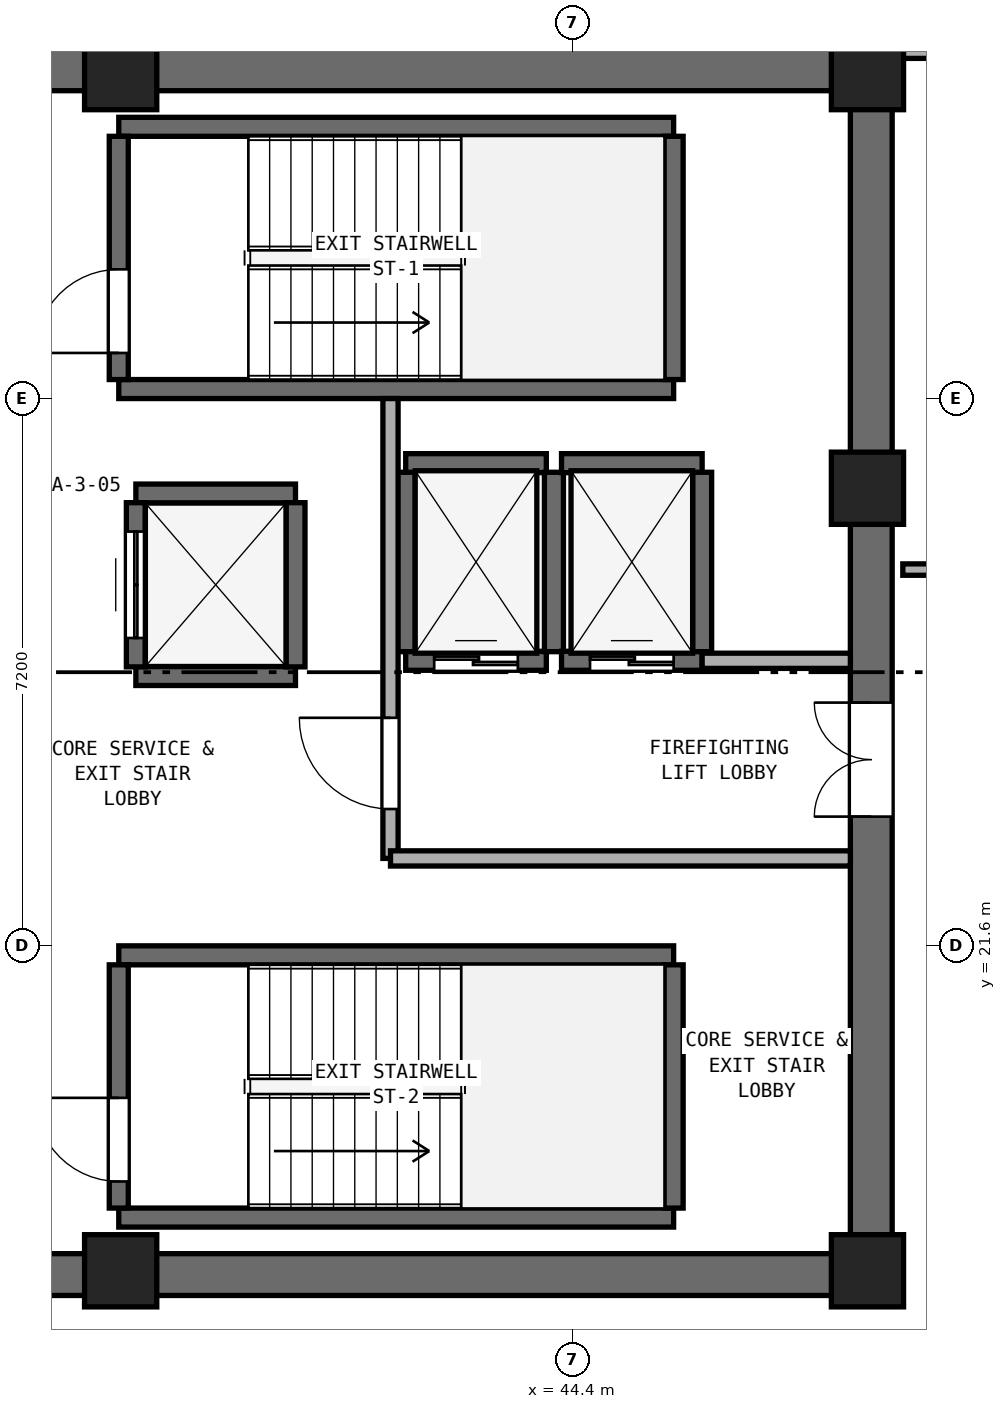
"""IFC4 building model, lengths in metres.
Left out: names, types, materials, properties, quantities, classifications, styles, units other than length and angle.
Written with IfcOpenShell. Run it as: python <this file> out.ifc"""

import sys

from ifc_helpers import new_model, si_unit, direction, frame, frame_2d, origin, origin_2d, place, context, subcontext, project, spatial, rectangle, extrude, element, fill, save


model = new_model("IFC4")
c1 = context("Model", 3, precision=1e-05, world=origin(), true_north=direction((0.0, 1.0)))
c2 = subcontext(c1, "Body", "Model", "MODEL_VIEW")
j1 = project(units=[si_unit("LENGTHUNIT", "METRE"), si_unit("PLANEANGLEUNIT", "RADIAN")], contexts=[c1])
p1 = place(None, origin())
s1 = spatial("IfcSite", under=j1, at=p1, CompositionType="ELEMENT")
p2 = place(p1, origin())
s2 = spatial("IfcBuilding", under=s1, at=p2, CompositionType="ELEMENT")
p3 = place(p2, frame((0.0, 0.0, 166.8)))
s3 = spatial("IfcBuildingStorey", under=s2, at=p3, CompositionType="ELEMENT", Elevation=166.8)
for number, where, z_axis, x_axis in (
    (1, (25.4, 17.275, 0.0), (0.0, 0.0, 1.0), (1.0, 0.0, 0.0)),
    (2, (25.4, 33.125, 0.0), (0.0, 0.0, 1.0), (1.0, 0.0, 0.0)),
):
    element("IfcWall", number, at=place(p3, frame(where, z_axis=z_axis, x_axis=x_axis)), inside=s3, PredefinedType="SHEAR", context=c2, shape_type="SweptSolid", body=[
        extrude(rectangle(XDim=23.2, YDim=0.55, at=frame_2d((11.6, 0.0))), origin(), (0.0, 0.0, 1.0), 3.54),
    ])
p4 = place(p3, frame((48.325, 17.55, 0.0), z_axis=(0.0, 0.0, 1.0), x_axis=(0.0, 1.0, 0.0)))
e3 = element("IfcWall", 3, at=p4, inside=s3, PredefinedType="SHEAR", context=c2, shape_type="SweptSolid", body=[
    extrude(rectangle(XDim=15.3, YDim=0.55, at=frame_2d((7.65, 0.0))), origin(), (0.0, 0.0, 1.0), 3.54),
])
p5 = place(p4, frame((5.75, 0.0, 0.0)))
e4 = element("IfcOpeningElement", 4, at=p5, cuts=e3, PredefinedType="OPENING", context=c2, shape_type="SweptSolid", body=[
    extrude(rectangle(XDim=1.5, YDim=2.15, at=frame_2d((0.75, 1.075))), frame((0.0, 0.285, 0.0), z_axis=(0.0, -1.0, 0.0), x_axis=(1.0, 0.0, 0.0)), (0.0, 0.0, 1.0), 0.57),
])
for number, where, z_axis, x_axis in (
    (5, (38.45, 17.325, 0.0), (0.0, 0.0, 1.0), (1.0, 0.0, 0.0)),
    (6, (48.275, 17.325, 0.0), (0.0, 0.0, 1.0), (1.0, 0.0, 0.0)),
    (7, (48.275, 27.62, 0.0), (0.0, 0.0, 1.0), (1.0, 0.0, 0.0)),
    (8, (48.275, 33.075, 0.0), (0.0, 0.0, 1.0), (1.0, 0.0, 0.0)),
    (9, (38.45, 33.075, 0.0), (0.0, 0.0, 1.0), (1.0, 0.0, 0.0)),
):
    element("IfcColumn", number, at=place(p3, frame(where, z_axis=z_axis, x_axis=x_axis)), inside=s3, PredefinedType="PILASTER", context=c2, shape_type="SweptSolid", body=[
        extrude(rectangle(XDim=0.95, YDim=0.95, at=origin_2d()), origin(), (0.0, 0.0, 1.0), 3.8),
    ])
for number, where, z_axis, x_axis in (
    (10, (38.425, 28.925, 0.0), (0.0, 0.0, 1.0), (1.0, 0.0, 0.0)),
    (11, (38.425, 32.375, 0.0), (0.0, 0.0, 1.0), (1.0, 0.0, 0.0)),
):
    element("IfcWall", number, at=place(p3, frame(where, z_axis=z_axis, x_axis=x_axis)), inside=s3, PredefinedType="SHEAR", context=c2, shape_type="SweptSolid", body=[
        extrude(rectangle(XDim=7.3, YDim=0.25, at=frame_2d((3.65, 0.0))), origin(), (0.0, 0.0, 1.0), 3.54),
    ])
p6 = place(p3, frame((38.425, 29.05, 0.0), z_axis=(0.0, 0.0, 1.0), x_axis=(0.0, 1.0, 0.0)))
e12 = element("IfcWall", 12, at=p6, inside=s3, PredefinedType="SHEAR", context=c2, shape_type="SweptSolid", body=[
    extrude(rectangle(XDim=3.2, YDim=0.25, at=frame_2d((1.6, 0.0))), origin(), (0.0, 0.0, 1.0), 3.54),
])
p7 = place(p6, frame((0.35, 0.0, 0.0)))
e13 = element("IfcOpeningElement", 13, at=p7, cuts=e12, PredefinedType="OPENING", context=c2, shape_type="SweptSolid", body=[
    extrude(rectangle(XDim=1.1, YDim=2.15, at=frame_2d((0.55, 1.075))), frame((0.0, 0.135, 0.0), z_axis=(0.0, -1.0, 0.0), x_axis=(1.0, 0.0, 0.0)), (0.0, 0.0, 1.0), 0.27),
])
p8 = place(p3, frame((45.725, 29.05, 0.0), z_axis=(0.0, 0.0, 1.0), x_axis=(0.0, 1.0, 0.0)))
e14 = element("IfcWall", 14, at=p8, inside=s3, PredefinedType="SHEAR", context=c2, shape_type="SweptSolid", body=[
    extrude(rectangle(XDim=3.2, YDim=0.25, at=frame_2d((1.6, 0.0))), origin(), (0.0, 0.0, 1.0), 3.54),
])
for number, where, z_axis, x_axis in (
    (15, (38.425, 18.025, 0.0), (0.0, 0.0, 1.0), (1.0, 0.0, 0.0)),
    (16, (38.425, 21.475, 0.0), (0.0, 0.0, 1.0), (1.0, 0.0, 0.0)),
):
    element("IfcWall", number, at=place(p3, frame(where, z_axis=z_axis, x_axis=x_axis)), inside=s3, PredefinedType="SHEAR", context=c2, shape_type="SweptSolid", body=[
        extrude(rectangle(XDim=7.3, YDim=0.25, at=frame_2d((3.65, 0.0))), origin(), (0.0, 0.0, 1.0), 3.54),
    ])
p9 = place(p3, frame((38.425, 18.15, 0.0), z_axis=(0.0, 0.0, 1.0), x_axis=(0.0, 1.0, 0.0)))
e17 = element("IfcWall", 17, at=p9, inside=s3, PredefinedType="SHEAR", context=c2, shape_type="SweptSolid", body=[
    extrude(rectangle(XDim=3.2, YDim=0.25, at=frame_2d((1.6, 0.0))), origin(), (0.0, 0.0, 1.0), 3.54),
])
p10 = place(p9, frame((0.35, 0.0, 0.0)))
e18 = element("IfcOpeningElement", 18, at=p10, cuts=e17, PredefinedType="OPENING", context=c2, shape_type="SweptSolid", body=[
    extrude(rectangle(XDim=1.1, YDim=2.15, at=frame_2d((0.55, 1.075))), frame((0.0, 0.135, 0.0), z_axis=(0.0, -1.0, 0.0), x_axis=(1.0, 0.0, 0.0)), (0.0, 0.0, 1.0), 0.27),
])
p11 = place(p3, frame((45.725, 18.15, 0.0), z_axis=(0.0, 0.0, 1.0), x_axis=(0.0, 1.0, 0.0)))
e19 = element("IfcWall", 19, at=p11, inside=s3, PredefinedType="SHEAR", context=c2, shape_type="SweptSolid", body=[
    extrude(rectangle(XDim=3.2, YDim=0.25, at=frame_2d((1.6, 0.0))), origin(), (0.0, 0.0, 1.0), 3.54),
])
p12 = place(p3, frame((42.2, 25.35, 0.0), z_axis=(0.0, 0.0, 1.0), x_axis=(1.0, 0.0, 0.0)))
e20 = element("IfcWall", 20, at=p12, inside=s3, PredefinedType="SHEAR", context=c2, shape_type="SweptSolid", body=[
    extrude(rectangle(XDim=1.85, YDim=0.25, at=frame_2d((0.925, 0.0))), origin(), (0.0, 0.0, 1.0), 3.54),
])
p13 = place(p12, frame((0.375, 0.0, 0.0)))
e21 = element("IfcOpeningElement", 21, at=p13, cuts=e20, PredefinedType="OPENING", context=c2, shape_type="SweptSolid", body=[
    extrude(rectangle(XDim=1.1, YDim=2.15, at=frame_2d((0.55, 1.075))), frame((0.0, 0.135, 0.0), z_axis=(0.0, -1.0, 0.0), x_axis=(1.0, 0.0, 0.0)), (0.0, 0.0, 1.0), 0.27),
])
p14 = place(p3, frame((42.2, 27.95, 0.0), z_axis=(0.0, 0.0, 1.0), x_axis=(1.0, 0.0, 0.0)))
e22 = element("IfcWall", 22, at=p14, inside=s3, PredefinedType="SHEAR", context=c2, shape_type="SweptSolid", body=[
    extrude(rectangle(XDim=1.85, YDim=0.25, at=frame_2d((0.925, 0.0))), origin(), (0.0, 0.0, 1.0), 3.54),
])
for number, where, z_axis, x_axis in (
    (23, (42.2, 25.47, 0.0), (0.0, 0.0, 1.0), (0.0, 1.0, 0.0)),
    (24, (44.15, 25.47, 0.0), (0.0, 0.0, 1.0), (0.0, 1.0, 0.0)),
):
    element("IfcWall", number, at=place(p3, frame(where, z_axis=z_axis, x_axis=x_axis)), inside=s3, PredefinedType="SHEAR", context=c2, shape_type="SweptSolid", body=[
        extrude(rectangle(XDim=2.36, YDim=0.25, at=frame_2d((1.18, 0.0))), origin(), (0.0, 0.0, 1.0), 3.54),
    ])
p15 = place(p3, frame((44.25, 25.35, 0.0), z_axis=(0.0, 0.0, 1.0), x_axis=(1.0, 0.0, 0.0)))
e25 = element("IfcWall", 25, at=p15, inside=s3, PredefinedType="SHEAR", context=c2, shape_type="SweptSolid", body=[
    extrude(rectangle(XDim=1.85, YDim=0.25, at=frame_2d((0.925, 0.0))), origin(), (0.0, 0.0, 1.0), 3.54),
])
p16 = place(p15, frame((0.375, 0.0, 0.0)))
e26 = element("IfcOpeningElement", 26, at=p16, cuts=e25, PredefinedType="OPENING", context=c2, shape_type="SweptSolid", body=[
    extrude(rectangle(XDim=1.1, YDim=2.15, at=frame_2d((0.55, 1.075))), frame((0.0, 0.135, 0.0), z_axis=(0.0, -1.0, 0.0), x_axis=(1.0, 0.0, 0.0)), (0.0, 0.0, 1.0), 0.27),
])
p17 = place(p3, frame((44.25, 27.95, 0.0), z_axis=(0.0, 0.0, 1.0), x_axis=(1.0, 0.0, 0.0)))
e27 = element("IfcWall", 27, at=p17, inside=s3, PredefinedType="SHEAR", context=c2, shape_type="SweptSolid", body=[
    extrude(rectangle(XDim=1.85, YDim=0.25, at=frame_2d((0.925, 0.0))), origin(), (0.0, 0.0, 1.0), 3.54),
])
p18 = place(p3, frame((46.1, 25.47, 0.0), z_axis=(0.0, 0.0, 1.0), x_axis=(0.0, 1.0, 0.0)))
e28 = element("IfcWall", 28, at=p18, inside=s3, PredefinedType="SHEAR", context=c2, shape_type="SweptSolid", body=[
    extrude(rectangle(XDim=2.36, YDim=0.25, at=frame_2d((1.18, 0.0))), origin(), (0.0, 0.0, 1.0), 3.54),
])
for number, where, z_axis, x_axis in (
    (29, (38.65, 25.15, 0.0), (0.0, 0.0, 1.0), (1.0, 0.0, 0.0)),
    (30, (38.65, 27.55, 0.0), (0.0, 0.0, 1.0), (1.0, 0.0, 0.0)),
):
    element("IfcWall", number, at=place(p3, frame(where, z_axis=z_axis, x_axis=x_axis)), inside=s3, PredefinedType="SHEAR", context=c2, shape_type="SweptSolid", body=[
        extrude(rectangle(XDim=2.1, YDim=0.25, at=frame_2d((1.05, 0.0))), origin(), (0.0, 0.0, 1.0), 3.54),
    ])
p19 = place(p3, frame((38.65, 25.27, 0.0), z_axis=(0.0, 0.0, 1.0), x_axis=(0.0, 1.0, 0.0)))
e31 = element("IfcWall", 31, at=p19, inside=s3, PredefinedType="SHEAR", context=c2, shape_type="SweptSolid", body=[
    extrude(rectangle(XDim=2.16, YDim=0.25, at=frame_2d((1.08, 0.0))), origin(), (0.0, 0.0, 1.0), 3.54),
])
p20 = place(p19, frame((0.38, 0.0, 0.0)))
e32 = element("IfcOpeningElement", 32, at=p20, cuts=e31, PredefinedType="OPENING", context=c2, shape_type="SweptSolid", body=[
    extrude(rectangle(XDim=1.4, YDim=2.2, at=frame_2d((0.7, 1.1))), frame((0.0, 0.135, 0.0), z_axis=(0.0, -1.0, 0.0), x_axis=(1.0, 0.0, 0.0)), (0.0, 0.0, 1.0), 0.27),
])
p21 = place(p3, frame((40.75, 25.27, 0.0), z_axis=(0.0, 0.0, 1.0), x_axis=(0.0, 1.0, 0.0)))
e33 = element("IfcWall", 33, at=p21, inside=s3, PredefinedType="SHEAR", context=c2, shape_type="SweptSolid", body=[
    extrude(rectangle(XDim=2.16, YDim=0.25, at=frame_2d((1.08, 0.0))), origin(), (0.0, 0.0, 1.0), 3.54),
])
p22 = place(p3, frame((42.0, 22.75, 0.0), z_axis=(0.0, 0.0, 1.0), x_axis=(0.0, 1.0, 0.0)))
e34 = element("IfcWall", 34, at=p22, inside=s3, PredefinedType="SOLIDWALL", context=c2, shape_type="SweptSolid", body=[
    extrude(rectangle(XDim=6.05, YDim=0.2, at=frame_2d((3.025, 0.0))), origin(), (0.0, 0.0, 1.0), 3.54),
])
p23 = place(p22, frame((0.65, 0.0, 0.0)))
e35 = element("IfcOpeningElement", 35, at=p23, cuts=e34, PredefinedType="OPENING", context=c2, shape_type="SweptSolid", body=[
    extrude(rectangle(XDim=1.2, YDim=2.15, at=frame_2d((0.6, 1.075))), frame((0.0, 0.11, 0.0), z_axis=(0.0, -1.0, 0.0), x_axis=(1.0, 0.0, 0.0)), (0.0, 0.0, 1.0), 0.22),
])
p24 = place(p3, frame((42.0, 22.75, 0.0), z_axis=(0.0, 0.0, 1.0), x_axis=(1.0, 0.0, 0.0)))
e36 = element("IfcWall", 36, at=p24, inside=s3, PredefinedType="SOLIDWALL", context=c2, shape_type="SweptSolid", body=[
    extrude(rectangle(XDim=6.05, YDim=0.2, at=frame_2d((3.025, 0.0))), origin(), (0.0, 0.0, 1.0), 3.54),
])
p25 = place(p3, frame((46.1, 25.35, 0.0), z_axis=(0.0, 0.0, 1.0), x_axis=(1.0, 0.0, 0.0)))
e37 = element("IfcWall", 37, at=p25, inside=s3, PredefinedType="SOLIDWALL", context=c2, shape_type="SweptSolid", body=[
    extrude(rectangle(XDim=1.95, YDim=0.2, at=frame_2d((0.975, 0.0))), origin(), (0.0, 0.0, 1.0), 3.54),
])
p26 = place(p3, frame((48.74, 26.55, 0.0), z_axis=(0.0, 0.0, 1.0), x_axis=(1.0, 0.0, 0.0)))
e38 = element("IfcWall", 38, at=p26, inside=s3, PredefinedType="PARTITIONING", context=c2, shape_type="SweptSolid", body=[
    extrude(rectangle(XDim=12.855, YDim=0.15, at=frame_2d((6.427, 0.0))), origin(), (0.0, 0.0, 1.0), 3.54),
])
p27 = place(p26, frame((5.927, 0.0, 0.0)))
e39 = element("IfcOpeningElement", 39, at=p27, cuts=e38, PredefinedType="OPENING", context=c2, shape_type="SweptSolid", body=[
    extrude(rectangle(XDim=1.0, YDim=2.12, at=frame_2d((0.5, 1.06))), frame((0.0, 0.085, 0.0), z_axis=(0.0, -1.0, 0.0), x_axis=(1.0, 0.0, 0.0)), (0.0, 0.0, 1.0), 0.17),
])
p28 = place(p3, frame((48.74, 33.35, 0.0), z_axis=(0.0, 0.0, 1.0), x_axis=(1.0, 0.0, 0.0)))
e40 = element("IfcWall", 40, at=p28, inside=s3, PredefinedType="PARTITIONING", context=c2, shape_type="SweptSolid", body=[
    extrude(rectangle(XDim=3.309, YDim=0.15, at=frame_2d((1.654, 0.0))), origin(), (0.0, 0.0, 1.0), 2.923),
])
p29 = place(p7, origin())
e41 = element("IfcDoor", 41, at=p29, inside=s3, OperationType="SINGLE_SWING_LEFT", PredefinedType="DOOR", context=c2, shape_type="SweptSolid", body=[
    extrude(rectangle(XDim=1.1, YDim=2.15, at=frame_2d((0.55, 1.075))), frame((0.0, 0.025, 0.0), z_axis=(0.0, -1.0, 0.0), x_axis=(1.0, 0.0, 0.0)), (0.0, 0.0, 1.0), 0.05),
])
fill(e13, e41)
p30 = place(p10, origin())
e42 = element("IfcDoor", 42, at=p30, inside=s3, OperationType="SINGLE_SWING_RIGHT", PredefinedType="DOOR", context=c2, shape_type="SweptSolid", body=[
    extrude(rectangle(XDim=1.1, YDim=2.15, at=frame_2d((0.55, 1.075))), frame((0.0, 0.025, 0.0), z_axis=(0.0, -1.0, 0.0), x_axis=(1.0, 0.0, 0.0)), (0.0, 0.0, 1.0), 0.05),
])
fill(e18, e42)
p31 = place(p13, origin())
e43 = element("IfcDoor", 43, at=p31, inside=s3, OperationType="DOUBLE_DOOR_SLIDING", PredefinedType="DOOR", context=c2, shape_type="SweptSolid", body=[
    extrude(rectangle(XDim=1.1, YDim=2.15, at=frame_2d((0.55, 1.075))), frame((0.0, 0.025, 0.0), z_axis=(0.0, -1.0, 0.0), x_axis=(1.0, 0.0, 0.0)), (0.0, 0.0, 1.0), 0.05),
])
fill(e21, e43)
p32 = place(p16, origin())
e44 = element("IfcDoor", 44, at=p32, inside=s3, OperationType="DOUBLE_DOOR_SLIDING", PredefinedType="DOOR", context=c2, shape_type="SweptSolid", body=[
    extrude(rectangle(XDim=1.1, YDim=2.15, at=frame_2d((0.55, 1.075))), frame((0.0, 0.025, 0.0), z_axis=(0.0, -1.0, 0.0), x_axis=(1.0, 0.0, 0.0)), (0.0, 0.0, 1.0), 0.05),
])
fill(e26, e44)
p33 = place(p20, origin())
e45 = element("IfcDoor", 45, at=p33, inside=s3, OperationType="DOUBLE_DOOR_SLIDING", PredefinedType="DOOR", context=c2, shape_type="SweptSolid", body=[
    extrude(rectangle(XDim=1.4, YDim=2.2, at=frame_2d((0.7, 1.1))), frame((0.0, 0.025, 0.0), z_axis=(0.0, -1.0, 0.0), x_axis=(1.0, 0.0, 0.0)), (0.0, 0.0, 1.0), 0.05),
])
fill(e32, e45)
p34 = place(p23, origin())
e46 = element("IfcDoor", 46, at=p34, inside=s3, OperationType="SINGLE_SWING_RIGHT", PredefinedType="DOOR", context=c2, shape_type="SweptSolid", body=[
    extrude(rectangle(XDim=1.2, YDim=2.15, at=frame_2d((0.6, 1.075))), frame((0.0, 0.025, 0.0), z_axis=(0.0, -1.0, 0.0), x_axis=(1.0, 0.0, 0.0)), (0.0, 0.0, 1.0), 0.05),
])
fill(e35, e46)
p35 = place(p5, origin())
e47 = element("IfcDoor", 47, at=p35, inside=s3, OperationType="DOUBLE_DOOR_SINGLE_SWING", PredefinedType="DOOR", context=c2, shape_type="SweptSolid", body=[
    extrude(rectangle(XDim=1.5, YDim=2.15, at=frame_2d((0.75, 1.075))), frame((0.0, 0.025, 0.0), z_axis=(0.0, -1.0, 0.0), x_axis=(1.0, 0.0, 0.0)), (0.0, 0.0, 1.0), 0.05),
])
fill(e4, e47)
save(model, sys.argv[1])
